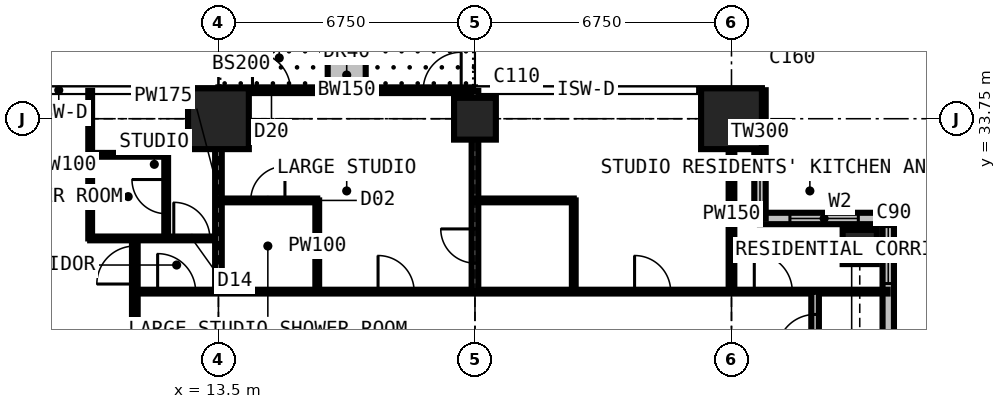
"""IFC4 building model, lengths in metres.
Left out: names, types, materials, properties, quantities, classifications, styles, units other than length and angle.
Written with IfcOpenShell. Run it as: python <this file> out.ifc"""

import sys

from ifc_helpers import new_model, si_unit, direction, frame, frame_2d, origin, origin_2d, place, context, subcontext, project, spatial, rectangle, extrude, element, fill, save


model = new_model("IFC4")
c1 = context("Model", 3, precision=1e-05, world=origin(), true_north=direction((0.0, 1.0)))
c2 = subcontext(c1, "Body", "Model", "MODEL_VIEW")
j1 = project(units=[si_unit("LENGTHUNIT", "METRE"), si_unit("PLANEANGLEUNIT", "RADIAN")], contexts=[c1])
p1 = place(None, origin())
s1 = spatial("IfcSite", under=j1, at=p1, CompositionType="ELEMENT")
p2 = place(p1, origin())
s2 = spatial("IfcBuilding", under=s1, at=p2, CompositionType="ELEMENT")
p3 = place(p2, frame((0.0, 0.0, 204.3)))
s3 = spatial("IfcBuildingStorey", under=s2, at=p3, CompositionType="ELEMENT", Elevation=204.3)
p4 = place(p3, frame((13.5, 33.75, 0.0), z_axis=(0.0, 0.0, 1.0), x_axis=(1.0, 0.0, 0.0)))
e1 = element("IfcColumn", 1, at=p4, inside=s3, PredefinedType="COLUMN", context=c2, shape_type="SweptSolid", body=[
    extrude(rectangle(XDim=1.6, YDim=1.6, at=origin_2d()), origin(), (0.0, 0.0, 1.0), 3.6),
])
p5 = place(p3, frame((20.25, 33.75, 0.0), z_axis=(0.0, 0.0, 1.0), x_axis=(1.0, 0.0, 0.0)))
e2 = element("IfcColumn", 2, at=p5, inside=s3, PredefinedType="COLUMN", context=c2, shape_type="SweptSolid", body=[
    extrude(rectangle(XDim=1.1, YDim=1.1, at=origin_2d()), origin(), (0.0, 0.0, 1.0), 3.6),
])
p6 = place(p3, frame((27.0, 33.75, 0.0), z_axis=(0.0, 0.0, 1.0), x_axis=(1.0, 0.0, 0.0)))
e3 = element("IfcColumn", 3, at=p6, inside=s3, PredefinedType="COLUMN", context=c2, shape_type="SweptSolid", body=[
    extrude(rectangle(XDim=1.6, YDim=1.6, at=origin_2d()), origin(), (0.0, 0.0, 1.0), 3.6),
])
p7 = place(p3, frame((30.375, 30.375, 0.0), z_axis=(0.0, 0.0, 1.0), x_axis=(1.0, 0.0, 0.0)))
e4 = element("IfcColumn", 4, at=p7, inside=s3, PredefinedType="COLUMN", context=c2, shape_type="SweptSolid", body=[
    extrude(rectangle(XDim=0.9, YDim=0.9, at=origin_2d()), origin(), (0.0, 0.0, 1.0), 3.6),
])
p8 = place(p3, frame((31.125, 27.75, 0.0), z_axis=(0.0, 0.0, 1.0), x_axis=(0.0, 1.0, 0.0)))
e5 = element("IfcWall", 5, at=p8, inside=s3, PredefinedType="SOLIDWALL", context=c2, shape_type="SweptSolid", body=[
    extrude(rectangle(XDim=3.375, YDim=0.3, at=frame_2d((1.688, 0.0))), origin(), (0.0, 0.0, 1.0), 3.375),
])
p9 = place(p8, frame((1.663, 0.0, 0.9)))
e6 = element("IfcOpeningElement", 6, at=p9, cuts=e5, PredefinedType="OPENING", context=c2, shape_type="SweptSolid", body=[
    extrude(rectangle(XDim=1.5, YDim=1.8, at=frame_2d((0.75, 0.9))), frame((0.0, 0.16, 0.0), z_axis=(0.0, -1.0, 0.0), x_axis=(1.0, 0.0, 0.0)), (0.0, 0.0, 1.0), 0.32),
])
p10 = place(p3, frame((31.125, 31.125, 0.0), z_axis=(0.0, 0.0, 1.0), x_axis=(-1.0, 0.0, 0.0)))
e7 = element("IfcWall", 7, at=p10, inside=s3, PredefinedType="SOLIDWALL", context=c2, shape_type="SweptSolid", body=[
    extrude(rectangle(XDim=3.375, YDim=0.3, at=frame_2d((1.688, 0.0))), origin(), (0.0, 0.0, 1.0), 3.375),
])
p11 = place(p10, frame((0.788, 0.0, 0.6)))
e8 = element("IfcOpeningElement", 8, at=p11, cuts=e7, PredefinedType="OPENING", context=c2, shape_type="SweptSolid", body=[
    extrude(rectangle(XDim=1.8, YDim=2.1, at=frame_2d((0.9, 1.05))), frame((0.0, 0.16, 0.0), z_axis=(0.0, -1.0, 0.0), x_axis=(1.0, 0.0, 0.0)), (0.0, 0.0, 1.0), 0.32),
])
p12 = place(p3, frame((27.75, 31.125, 0.0), z_axis=(0.0, 0.0, 1.0), x_axis=(0.0, 1.0, 0.0)))
e9 = element("IfcWall", 9, at=p12, inside=s3, PredefinedType="SOLIDWALL", context=c2, shape_type="SweptSolid", body=[
    extrude(rectangle(XDim=3.375, YDim=0.3, at=frame_2d((1.688, 0.0))), origin(), (0.0, 0.0, 1.0), 3.375),
])
p13 = place(p12, frame((0.242, 0.0, 0.9)))
e10 = element("IfcOpeningElement", 10, at=p13, cuts=e9, PredefinedType="OPENING", context=c2, shape_type="SweptSolid", body=[
    extrude(rectangle(XDim=1.5, YDim=1.8, at=frame_2d((0.75, 0.9))), frame((0.0, 0.16, 0.0), z_axis=(0.0, -1.0, 0.0), x_axis=(1.0, 0.0, 0.0)), (0.0, 0.0, 1.0), 0.32),
])
p14 = place(p3, frame((13.5, 34.5, 0.0), z_axis=(0.0, 0.0, 1.0), x_axis=(1.0, 0.0, 0.0)))
e11 = element("IfcWall", 11, at=p14, inside=s3, PredefinedType="SOLIDWALL", context=c2, shape_type="SweptSolid", body=[
    extrude(rectangle(XDim=6.75, YDim=0.15, at=frame_2d((3.375, 0.0))), origin(), (0.0, 0.0, 1.0), 3.375),
])
p15 = place(p14, frame((0.896, 0.0, 0.0)))
e12 = element("IfcOpeningElement", 12, at=p15, cuts=e11, PredefinedType="OPENING", context=c2, shape_type="SweptSolid", body=[
    extrude(rectangle(XDim=1.0, YDim=2.2, at=frame_2d((0.5, 1.1))), frame((0.0, 0.085, 0.0), z_axis=(0.0, -1.0, 0.0), x_axis=(1.0, 0.0, 0.0)), (0.0, 0.0, 1.0), 0.17),
])
p16 = place(p14, frame((1.992, 0.0, 0.9)))
e13 = element("IfcOpeningElement", 13, at=p16, cuts=e11, PredefinedType="OPENING", context=c2, shape_type="SweptSolid", body=[
    extrude(rectangle(XDim=1.2, YDim=1.8, at=frame_2d((0.6, 0.9))), frame((0.0, 0.085, 0.0), z_axis=(0.0, -1.0, 0.0), x_axis=(1.0, 0.0, 0.0)), (0.0, 0.0, 1.0), 0.17),
])
p17 = place(p14, frame((5.387, 0.0, 0.0)))
e14 = element("IfcOpeningElement", 14, at=p17, cuts=e11, PredefinedType="OPENING", context=c2, shape_type="SweptSolid", body=[
    extrude(rectangle(XDim=1.0, YDim=2.2, at=frame_2d((0.5, 1.1))), frame((0.0, 0.085, 0.0), z_axis=(0.0, -1.0, 0.0), x_axis=(1.0, 0.0, 0.0)), (0.0, 0.0, 1.0), 0.17),
])
p18 = place(p14, frame((3.825, 0.0, 0.9)))
e15 = element("IfcOpeningElement", 15, at=p18, cuts=e11, PredefinedType="OPENING", context=c2, shape_type="SweptSolid", body=[
    extrude(rectangle(XDim=1.2, YDim=1.8, at=frame_2d((0.6, 0.9))), frame((0.0, 0.085, 0.0), z_axis=(0.0, -1.0, 0.0), x_axis=(1.0, 0.0, 0.0)), (0.0, 0.0, 1.0), 0.17),
])
p19 = place(p3, frame((16.875, 34.6, 0.0), z_axis=(0.0, 0.0, 1.0), x_axis=(0.0, 1.0, 0.0)))
e16 = element("IfcWall", 16, at=p19, inside=s3, PredefinedType="USERDEFINED", context=c2, shape_type="SweptSolid", body=[
    extrude(rectangle(XDim=2.2, YDim=1.0, at=frame_2d((1.1, 0.0))), origin(), (0.0, 0.0, 1.0), 0.9),
])
p20 = place(p3, frame((10.125, 30.6, 0.0), z_axis=(0.0, 0.0, 1.0), x_axis=(0.0, 1.0, 0.0)))
e17 = element("IfcWall", 17, at=p20, inside=s3, PredefinedType="PARTITIONING", context=c2, shape_type="SweptSolid", body=[
    extrude(rectangle(XDim=3.884, YDim=0.1, at=frame_2d((1.942, 0.0))), origin(), (0.0, 0.0, 1.0), 3.375),
])
p21 = place(p3, frame((10.125, 30.6, 0.0), z_axis=(0.0, 0.0, 1.0), x_axis=(1.0, 0.0, 0.0)))
e18 = element("IfcWall", 18, at=p21, inside=s3, PredefinedType="PARTITIONING", context=c2, shape_type="SweptSolid", body=[
    extrude(rectangle(XDim=3.375, YDim=0.1, at=frame_2d((1.688, 0.0))), origin(), (0.0, 0.0, 1.0), 3.375),
])
p22 = place(p21, frame((2.2, 0.0, 0.0)))
e19 = element("IfcOpeningElement", 19, at=p22, cuts=e18, PredefinedType="OPENING", context=c2, shape_type="SweptSolid", body=[
    extrude(rectangle(XDim=0.95, YDim=2.2, at=frame_2d((0.475, 1.1))), frame((0.0, 0.06, 0.0), z_axis=(0.0, -1.0, 0.0), x_axis=(1.0, 0.0, 0.0)), (0.0, 0.0, 1.0), 0.12),
])
p23 = place(p3, frame((10.125, 32.8, 0.0), z_axis=(0.0, 0.0, 1.0), x_axis=(1.0, 0.0, 0.0)))
e20 = element("IfcWall", 20, at=p23, inside=s3, PredefinedType="PARTITIONING", context=c2, shape_type="SweptSolid", body=[
    extrude(rectangle(XDim=2.0, YDim=0.1, at=frame_2d((1.0, 0.0))), origin(), (0.0, 0.0, 1.0), 3.375),
])
p24 = place(p3, frame((11.3, 11.3, 0.0), z_axis=(0.0, 0.0, 1.0), x_axis=(0.0, 1.0, 0.0)))
e21 = element("IfcWall", 21, at=p24, inside=s3, PredefinedType="PARTITIONING", context=c2, shape_type="SweptSolid", body=[
    extrude(rectangle(XDim=19.3, YDim=0.15, at=frame_2d((9.65, 0.0))), origin(), (0.0, 0.0, 1.0), 3.375),
])
p25 = place(p24, frame((18.1, 0.0, 0.0)))
e22 = element("IfcOpeningElement", 22, at=p25, cuts=e21, PredefinedType="OPENING", context=c2, shape_type="SweptSolid", body=[
    extrude(rectangle(XDim=1.0, YDim=2.2, at=frame_2d((0.5, 1.1))), frame((0.0, 0.085, 0.0), z_axis=(0.0, -1.0, 0.0), x_axis=(1.0, 0.0, 0.0)), (0.0, 0.0, 1.0), 0.17),
])
p26 = place(p24, frame((10.137, 0.0, 0.0)))
e23 = element("IfcOpeningElement", 23, at=p26, cuts=e21, PredefinedType="OPENING", context=c2, shape_type="SweptSolid", body=[
    extrude(rectangle(XDim=1.0, YDim=2.2, at=frame_2d((0.5, 1.1))), frame((0.0, 0.085, 0.0), z_axis=(0.0, -1.0, 0.0), x_axis=(1.0, 0.0, 0.0)), (0.0, 0.0, 1.0), 0.17),
])
p27 = place(p3, frame((11.3, 29.2, 0.0), z_axis=(0.0, 0.0, 1.0), x_axis=(1.0, 0.0, 0.0)))
e24 = element("IfcWall", 24, at=p27, inside=s3, PredefinedType="PARTITIONING", context=c2, shape_type="SweptSolid", body=[
    extrude(rectangle(XDim=19.809, YDim=0.1, at=frame_2d((9.904, 0.0))), origin(), (0.0, 0.0, 1.0), 3.375),
])
p28 = place(p27, frame((16.3, 0.0, 0.0)))
e25 = element("IfcOpeningElement", 25, at=p28, cuts=e24, PredefinedType="OPENING", context=c2, shape_type="SweptSolid", body=[
    extrude(rectangle(XDim=1.0, YDim=2.2, at=frame_2d((0.5, 1.1))), frame((0.0, 0.06, 0.0), z_axis=(0.0, -1.0, 0.0), x_axis=(1.0, 0.0, 0.0)), (0.0, 0.0, 1.0), 0.12),
])
p29 = place(p27, frame((6.4, 0.0, 0.0)))
e26 = element("IfcOpeningElement", 26, at=p29, cuts=e24, PredefinedType="OPENING", context=c2, shape_type="SweptSolid", body=[
    extrude(rectangle(XDim=0.95, YDim=2.2, at=frame_2d((0.475, 1.1))), frame((0.0, 0.06, 0.0), z_axis=(0.0, -1.0, 0.0), x_axis=(1.0, 0.0, 0.0)), (0.0, 0.0, 1.0), 0.12),
])
p30 = place(p27, frame((13.15, 0.0, 0.0)))
e27 = element("IfcOpeningElement", 27, at=p30, cuts=e24, PredefinedType="OPENING", context=c2, shape_type="SweptSolid", body=[
    extrude(rectangle(XDim=0.95, YDim=2.2, at=frame_2d((0.475, 1.1))), frame((0.0, 0.06, 0.0), z_axis=(0.0, -1.0, 0.0), x_axis=(1.0, 0.0, 0.0)), (0.0, 0.0, 1.0), 0.12),
])
p31 = place(p27, frame((0.6, 0.0, 0.0)))
e28 = element("IfcOpeningElement", 28, at=p31, cuts=e24, PredefinedType="OPENING", context=c2, shape_type="SweptSolid", body=[
    extrude(rectangle(XDim=1.0, YDim=2.2, at=frame_2d((0.5, 1.1))), frame((0.0, 0.06, 0.0), z_axis=(0.0, -1.0, 0.0), x_axis=(1.0, 0.0, 0.0)), (0.0, 0.0, 1.0), 0.12),
])
p32 = place(p3, frame((12.125, 30.6, 0.0), z_axis=(0.0, 0.0, 1.0), x_axis=(0.0, 1.0, 0.0)))
e29 = element("IfcWall", 29, at=p32, inside=s3, PredefinedType="PARTITIONING", context=c2, shape_type="SweptSolid", body=[
    extrude(rectangle(XDim=2.2, YDim=0.1, at=frame_2d((1.1, 0.0))), origin(), (0.0, 0.0, 1.0), 3.375),
])
p33 = place(p32, frame((0.65, 0.0, 0.0)))
e30 = element("IfcOpeningElement", 30, at=p33, cuts=e29, PredefinedType="OPENING", context=c2, shape_type="SweptSolid", body=[
    extrude(rectangle(XDim=0.9, YDim=2.2, at=frame_2d((0.45, 1.1))), frame((0.0, 0.06, 0.0), z_axis=(0.0, -1.0, 0.0), x_axis=(1.0, 0.0, 0.0)), (0.0, 0.0, 1.0), 0.12),
])
p34 = place(p3, frame((13.5, 29.2, 0.0), z_axis=(0.0, 0.0, 1.0), x_axis=(0.0, 1.0, 0.0)))
e31 = element("IfcWall", 31, at=p34, inside=s3, PredefinedType="PARTITIONING", context=c2, shape_type="SweptSolid", body=[
    extrude(rectangle(XDim=5.284, YDim=0.175, at=frame_2d((2.642, 0.0))), origin(), (0.0, 0.0, 1.0), 2.806),
])
p35 = place(p3, frame((13.5, 31.6, 0.0), z_axis=(0.0, 0.0, 1.0), x_axis=(1.0, 0.0, 0.0)))
e32 = element("IfcWall", 32, at=p35, inside=s3, PredefinedType="PARTITIONING", context=c2, shape_type="SweptSolid", body=[
    extrude(rectangle(XDim=2.6, YDim=0.1, at=frame_2d((1.3, 0.0))), origin(), (0.0, 0.0, 1.0), 3.375),
])
p36 = place(p35, frame((0.85, 0.0, 0.0)))
e33 = element("IfcOpeningElement", 33, at=p36, cuts=e32, PredefinedType="OPENING", context=c2, shape_type="SweptSolid", body=[
    extrude(rectangle(XDim=0.9, YDim=2.2, at=frame_2d((0.45, 1.1))), frame((0.0, 0.06, 0.0), z_axis=(0.0, -1.0, 0.0), x_axis=(1.0, 0.0, 0.0)), (0.0, 0.0, 1.0), 0.12),
])
p37 = place(p3, frame((16.1, 29.2, 0.0), z_axis=(0.0, 0.0, 1.0), x_axis=(0.0, 1.0, 0.0)))
e34 = element("IfcWall", 34, at=p37, inside=s3, PredefinedType="PARTITIONING", context=c2, shape_type="SweptSolid", body=[
    extrude(rectangle(XDim=2.4, YDim=0.1, at=frame_2d((1.2, 0.0))), origin(), (0.0, 0.0, 1.0), 3.375),
])
p38 = place(p3, frame((20.25, 29.2, 0.0), z_axis=(0.0, 0.0, 1.0), x_axis=(0.0, 1.0, 0.0)))
e35 = element("IfcWall", 35, at=p38, inside=s3, PredefinedType="PARTITIONING", context=c2, shape_type="SweptSolid", body=[
    extrude(rectangle(XDim=5.284, YDim=0.175, at=frame_2d((2.642, 0.0))), origin(), (0.0, 0.0, 1.0), 2.806),
])
p39 = place(p38, frame((0.75, 0.0, 0.0)))
e36 = element("IfcOpeningElement", 36, at=p39, cuts=e35, PredefinedType="OPENING", context=c2, shape_type="SweptSolid", body=[
    extrude(rectangle(XDim=0.9, YDim=2.2, at=frame_2d((0.45, 1.1))), frame((0.0, 0.097, 0.0), z_axis=(0.0, -1.0, 0.0), x_axis=(1.0, 0.0, 0.0)), (0.0, 0.0, 1.0), 0.195),
])
p40 = place(p3, frame((20.25, 31.6, 0.0), z_axis=(0.0, 0.0, 1.0), x_axis=(1.0, 0.0, 0.0)))
e37 = element("IfcWall", 37, at=p40, inside=s3, PredefinedType="PARTITIONING", context=c2, shape_type="SweptSolid", body=[
    extrude(rectangle(XDim=2.6, YDim=0.1, at=frame_2d((1.3, 0.0))), origin(), (0.0, 0.0, 1.0), 3.375),
])
p41 = place(p3, frame((22.85, 29.2, 0.0), z_axis=(0.0, 0.0, 1.0), x_axis=(0.0, 1.0, 0.0)))
e38 = element("IfcWall", 38, at=p41, inside=s3, PredefinedType="PARTITIONING", context=c2, shape_type="SweptSolid", body=[
    extrude(rectangle(XDim=2.4, YDim=0.1, at=frame_2d((1.2, 0.0))), origin(), (0.0, 0.0, 1.0), 3.375),
])
p42 = place(p3, frame((27.0, 29.2, 0.0), z_axis=(0.0, 0.0, 1.0), x_axis=(0.0, 1.0, 0.0)))
e39 = element("IfcWall", 39, at=p42, inside=s3, PredefinedType="PARTITIONING", context=c2, shape_type="SweptSolid", body=[
    extrude(rectangle(XDim=5.284, YDim=0.15, at=frame_2d((2.642, 0.0))), origin(), (0.0, 0.0, 1.0), 2.806),
])
p43 = place(p3, frame((29.2, 11.3, 0.0), z_axis=(0.0, 0.0, 1.0), x_axis=(0.0, 1.0, 0.0)))
e40 = element("IfcWall", 40, at=p43, inside=s3, PredefinedType="PARTITIONING", context=c2, shape_type="SweptSolid", body=[
    extrude(rectangle(XDim=17.9, YDim=0.2, at=frame_2d((8.95, 0.0))), origin(), (0.0, 0.0, 1.0), 3.375),
])
p44 = place(p43, frame((2.3, 0.0, 0.0)))
e41 = element("IfcOpeningElement", 41, at=p44, cuts=e40, PredefinedType="OPENING", context=c2, shape_type="SweptSolid", body=[
    extrude(rectangle(XDim=1.0, YDim=2.2, at=frame_2d((0.5, 1.1))), frame((0.0, 0.11, 0.0), z_axis=(0.0, -1.0, 0.0), x_axis=(1.0, 0.0, 0.0)), (0.0, 0.0, 1.0), 0.22),
])
p45 = place(p43, frame((10.55, 0.0, 0.0)))
e42 = element("IfcOpeningElement", 42, at=p45, cuts=e40, PredefinedType="OPENING", context=c2, shape_type="SweptSolid", body=[
    extrude(rectangle(XDim=0.95, YDim=2.2, at=frame_2d((0.475, 1.1))), frame((0.0, 0.11, 0.0), z_axis=(0.0, -1.0, 0.0), x_axis=(1.0, 0.0, 0.0)), (0.0, 0.0, 1.0), 0.22),
])
p46 = place(p43, frame((5.775, 0.0, 0.0)))
e43 = element("IfcOpeningElement", 43, at=p46, cuts=e40, PredefinedType="OPENING", context=c2, shape_type="SweptSolid", body=[
    extrude(rectangle(XDim=0.95, YDim=2.2, at=frame_2d((0.475, 1.1))), frame((0.0, 0.11, 0.0), z_axis=(0.0, -1.0, 0.0), x_axis=(1.0, 0.0, 0.0)), (0.0, 0.0, 1.0), 0.22),
])
p47 = place(p43, frame((16.3, 0.0, 0.0)))
e44 = element("IfcOpeningElement", 44, at=p47, cuts=e40, PredefinedType="OPENING", context=c2, shape_type="SweptSolid", body=[
    extrude(rectangle(XDim=1.0, YDim=2.2, at=frame_2d((0.5, 1.1))), frame((0.0, 0.11, 0.0), z_axis=(0.0, -1.0, 0.0), x_axis=(1.0, 0.0, 0.0)), (0.0, 0.0, 1.0), 0.22),
])
p48 = place(p9, origin())
e45 = element("IfcWindow", 45, at=p48, inside=s3, PartitioningType="SINGLE_PANEL", PredefinedType="WINDOW", context=c2, shape_type="SweptSolid", body=[
    extrude(rectangle(XDim=1.5, YDim=1.8, at=frame_2d((0.75, 0.9))), frame((0.0, 0.03, 0.0), z_axis=(0.0, -1.0, 0.0), x_axis=(1.0, 0.0, 0.0)), (0.0, 0.0, 1.0), 0.06),
])
fill(e6, e45)
p49 = place(p11, origin())
e46 = element("IfcWindow", 46, at=p49, inside=s3, PartitioningType="SINGLE_PANEL", PredefinedType="WINDOW", context=c2, shape_type="SweptSolid", body=[
    extrude(rectangle(XDim=1.8, YDim=2.1, at=frame_2d((0.9, 1.05))), frame((0.0, 0.03, 0.0), z_axis=(0.0, -1.0, 0.0), x_axis=(1.0, 0.0, 0.0)), (0.0, 0.0, 1.0), 0.06),
])
fill(e8, e46)
p50 = place(p13, origin())
e47 = element("IfcWindow", 47, at=p50, inside=s3, PartitioningType="SINGLE_PANEL", PredefinedType="WINDOW", context=c2, shape_type="SweptSolid", body=[
    extrude(rectangle(XDim=1.5, YDim=1.8, at=frame_2d((0.75, 0.9))), frame((0.0, 0.03, 0.0), z_axis=(0.0, -1.0, 0.0), x_axis=(1.0, 0.0, 0.0)), (0.0, 0.0, 1.0), 0.06),
])
fill(e10, e47)
p51 = place(p15, origin())
e48 = element("IfcDoor", 48, at=p51, inside=s3, OperationType="SINGLE_SWING_LEFT", PredefinedType="DOOR", context=c2, shape_type="SweptSolid", body=[
    extrude(rectangle(XDim=1.0, YDim=2.2, at=frame_2d((0.5, 1.1))), frame((0.0, 0.025, 0.0), z_axis=(0.0, -1.0, 0.0), x_axis=(1.0, 0.0, 0.0)), (0.0, 0.0, 1.0), 0.05),
])
fill(e12, e48)
p52 = place(p16, origin())
e49 = element("IfcWindow", 49, at=p52, inside=s3, PartitioningType="SINGLE_PANEL", PredefinedType="WINDOW", context=c2, shape_type="SweptSolid", body=[
    extrude(rectangle(XDim=1.2, YDim=1.8, at=frame_2d((0.6, 0.9))), frame((0.0, 0.03, 0.0), z_axis=(0.0, -1.0, 0.0), x_axis=(1.0, 0.0, 0.0)), (0.0, 0.0, 1.0), 0.06),
])
fill(e13, e49)
p53 = place(p17, origin())
e50 = element("IfcDoor", 50, at=p53, inside=s3, OperationType="SINGLE_SWING_RIGHT", PredefinedType="DOOR", context=c2, shape_type="SweptSolid", body=[
    extrude(rectangle(XDim=1.0, YDim=2.2, at=frame_2d((0.5, 1.1))), frame((0.0, 0.025, 0.0), z_axis=(0.0, -1.0, 0.0), x_axis=(1.0, 0.0, 0.0)), (0.0, 0.0, 1.0), 0.05),
])
fill(e14, e50)
p54 = place(p18, origin())
e51 = element("IfcWindow", 51, at=p54, inside=s3, PartitioningType="SINGLE_PANEL", PredefinedType="WINDOW", context=c2, shape_type="SweptSolid", body=[
    extrude(rectangle(XDim=1.2, YDim=1.8, at=frame_2d((0.6, 0.9))), frame((0.0, 0.03, 0.0), z_axis=(0.0, -1.0, 0.0), x_axis=(1.0, 0.0, 0.0)), (0.0, 0.0, 1.0), 0.06),
])
fill(e15, e51)
p55 = place(p47, origin())
e52 = element("IfcDoor", 52, at=p55, inside=s3, OperationType="SINGLE_SWING_LEFT", PredefinedType="DOOR", context=c2, shape_type="SweptSolid", body=[
    extrude(rectangle(XDim=1.0, YDim=2.2, at=frame_2d((0.5, 1.1))), frame((0.0, 0.025, 0.0), z_axis=(0.0, -1.0, 0.0), x_axis=(1.0, 0.0, 0.0)), (0.0, 0.0, 1.0), 0.05),
])
fill(e44, e52)
p56 = place(p28, origin())
e53 = element("IfcDoor", 53, at=p56, inside=s3, OperationType="SINGLE_SWING_LEFT", PredefinedType="DOOR", context=c2, shape_type="SweptSolid", body=[
    extrude(rectangle(XDim=1.0, YDim=2.2, at=frame_2d((0.5, 1.1))), frame((0.0, 0.025, 0.0), z_axis=(0.0, -1.0, 0.0), x_axis=(1.0, 0.0, 0.0)), (0.0, 0.0, 1.0), 0.05),
])
fill(e25, e53)
p57 = place(p29, origin())
e54 = element("IfcDoor", 54, at=p57, inside=s3, OperationType="SINGLE_SWING_LEFT", PredefinedType="DOOR", context=c2, shape_type="SweptSolid", body=[
    extrude(rectangle(XDim=0.95, YDim=2.2, at=frame_2d((0.475, 1.1))), frame((0.0, 0.025, 0.0), z_axis=(0.0, -1.0, 0.0), x_axis=(1.0, 0.0, 0.0)), (0.0, 0.0, 1.0), 0.05),
])
fill(e26, e54)
p58 = place(p36, origin())
e55 = element("IfcDoor", 55, at=p58, inside=s3, OperationType="SINGLE_SWING_RIGHT", PredefinedType="DOOR", context=c2, shape_type="SweptSolid", body=[
    extrude(rectangle(XDim=0.9, YDim=2.2, at=frame_2d((0.45, 1.1))), frame((0.0, 0.025, 0.0), z_axis=(0.0, -1.0, 0.0), x_axis=(1.0, 0.0, 0.0)), (0.0, 0.0, 1.0), 0.05),
])
fill(e33, e55)
p59 = place(p30, origin())
e56 = element("IfcDoor", 56, at=p59, inside=s3, OperationType="SINGLE_SWING_LEFT", PredefinedType="DOOR", context=c2, shape_type="SweptSolid", body=[
    extrude(rectangle(XDim=0.95, YDim=2.2, at=frame_2d((0.475, 1.1))), frame((0.0, 0.025, 0.0), z_axis=(0.0, -1.0, 0.0), x_axis=(1.0, 0.0, 0.0)), (0.0, 0.0, 1.0), 0.05),
])
fill(e27, e56)
p60 = place(p39, origin())
e57 = element("IfcDoor", 57, at=p60, inside=s3, OperationType="SINGLE_SWING_RIGHT", PredefinedType="DOOR", context=c2, shape_type="SweptSolid", body=[
    extrude(rectangle(XDim=0.9, YDim=2.2, at=frame_2d((0.45, 1.1))), frame((0.0, 0.025, 0.0), z_axis=(0.0, -1.0, 0.0), x_axis=(1.0, 0.0, 0.0)), (0.0, 0.0, 1.0), 0.05),
])
fill(e36, e57)
p61 = place(p22, origin())
e58 = element("IfcDoor", 58, at=p61, inside=s3, OperationType="SINGLE_SWING_LEFT", PredefinedType="DOOR", context=c2, shape_type="SweptSolid", body=[
    extrude(rectangle(XDim=0.95, YDim=2.2, at=frame_2d((0.475, 1.1))), frame((0.0, 0.025, 0.0), z_axis=(0.0, -1.0, 0.0), x_axis=(1.0, 0.0, 0.0)), (0.0, 0.0, 1.0), 0.05),
])
fill(e19, e58)
p62 = place(p33, origin())
e59 = element("IfcDoor", 59, at=p62, inside=s3, OperationType="SINGLE_SWING_RIGHT", PredefinedType="DOOR", context=c2, shape_type="SweptSolid", body=[
    extrude(rectangle(XDim=0.9, YDim=2.2, at=frame_2d((0.45, 1.1))), frame((0.0, 0.025, 0.0), z_axis=(0.0, -1.0, 0.0), x_axis=(1.0, 0.0, 0.0)), (0.0, 0.0, 1.0), 0.05),
])
fill(e30, e59)
p63 = place(p31, origin())
e60 = element("IfcDoor", 60, at=p63, inside=s3, OperationType="SINGLE_SWING_LEFT", PredefinedType="DOOR", context=c2, shape_type="SweptSolid", body=[
    extrude(rectangle(XDim=1.0, YDim=2.2, at=frame_2d((0.5, 1.1))), frame((0.0, 0.025, 0.0), z_axis=(0.0, -1.0, 0.0), x_axis=(1.0, 0.0, 0.0)), (0.0, 0.0, 1.0), 0.05),
])
fill(e28, e60)
p64 = place(p25, origin())
e61 = element("IfcDoor", 61, at=p64, inside=s3, OperationType="SINGLE_SWING_LEFT", PredefinedType="DOOR", context=c2, shape_type="SweptSolid", body=[
    extrude(rectangle(XDim=1.0, YDim=2.2, at=frame_2d((0.5, 1.1))), frame((0.0, 0.025, 0.0), z_axis=(0.0, -1.0, 0.0), x_axis=(1.0, 0.0, 0.0)), (0.0, 0.0, 1.0), 0.05),
])
fill(e22, e61)
save(model, sys.argv[1])
